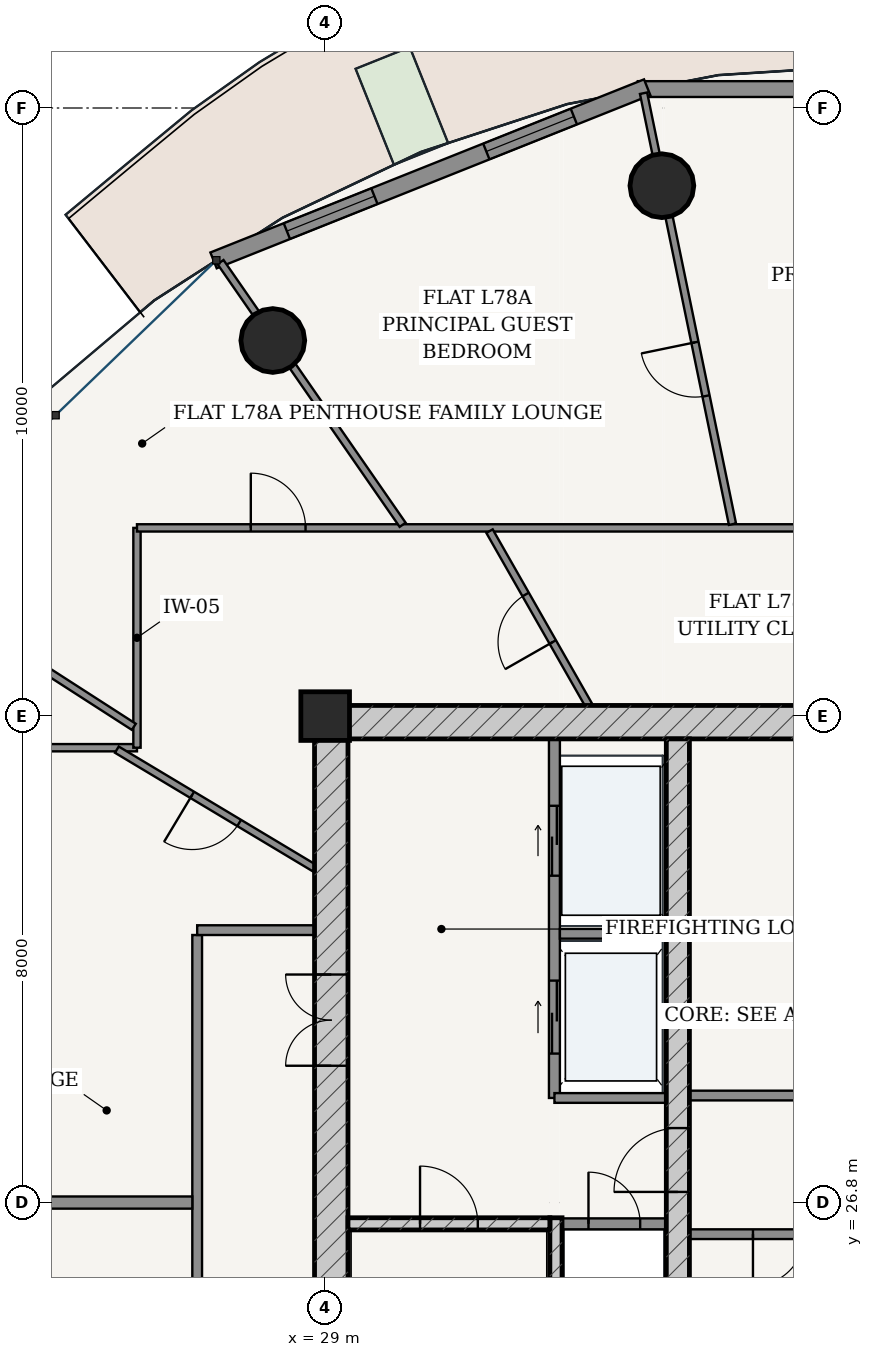
"""IFC4 building model, lengths in metres.
Left out: names, types, materials, properties, quantities, classifications, styles, units other than length and angle.
Written with IfcOpenShell. Run it as: python <this file> out.ifc"""

import sys

from ifc_helpers import new_model, si_unit, direction, frame, frame_2d, origin, origin_2d, place, context, subcontext, project, spatial, rectangle, hollow_circle, extrude, source, transform, mapped, element, fill, save


model = new_model("IFC4")
c1 = context("Model", 3, precision=1e-05, world=origin(), true_north=direction((-0.2419218956, 0.970295726276)))
c2 = subcontext(c1, "Body", "Model", "MODEL_VIEW")
j1 = project(units=[si_unit("LENGTHUNIT", "METRE"), si_unit("PLANEANGLEUNIT", "RADIAN")], contexts=[c1])
p1 = place(None, origin())
s1 = spatial("IfcSite", under=j1, at=p1, CompositionType="ELEMENT")
p2 = place(p1, origin())
s2 = spatial("IfcBuilding", under=s1, at=p2, CompositionType="ELEMENT")
p3 = place(p2, frame((0.0, 0.0, 296.95)))
s3 = spatial("IfcBuildingStorey", under=s2, at=p3, CompositionType="ELEMENT", Elevation=296.95)
p4 = place(p3, frame((29.0, 34.8, 0.0), z_axis=(0.0, 0.0, 1.0), x_axis=(1.0, 0.0, 0.0)))
e1 = element("IfcColumn", 1, at=p4, inside=s3, PredefinedType="COLUMN", context=c2, shape_type="SweptSolid", body=[
    extrude(rectangle(XDim=0.8, YDim=0.8, at=origin_2d()), origin(), (0.0, 0.0, 1.0), 3.75),
])
p5 = place(p3, frame((28.825, 34.7, 0.0), z_axis=(0.0, 0.0, 1.0), x_axis=(1.0, 0.0, 0.0)))
e2 = element("IfcWall", 2, at=p5, inside=s3, PredefinedType="SHEAR", context=c2, shape_type="SweptSolid", body=[
    extrude(rectangle(XDim=18.35, YDim=0.55, at=frame_2d((9.175, 0.0))), origin(), (0.0, 0.0, 1.0), 3.3),
])
p6 = place(p3, frame((29.1, 19.175, 0.0), z_axis=(0.0, 0.0, 1.0), x_axis=(0.0, 1.0, 0.0)))
e3 = element("IfcWall", 3, at=p6, inside=s3, PredefinedType="SHEAR", context=c2, shape_type="SweptSolid", body=[
    extrude(rectangle(XDim=15.25, YDim=0.55, at=frame_2d((7.625, 0.0))), origin(), (0.0, 0.0, 1.0), 3.3),
])
p7 = place(p6, frame((9.875, 0.0, 0.0)))
e4 = element("IfcOpeningElement", 4, at=p7, cuts=e3, PredefinedType="OPENING", context=c2, shape_type="SweptSolid", body=[
    extrude(rectangle(XDim=1.5, YDim=2.2, at=frame_2d((0.75, 1.1))), frame((0.0, 0.285, 0.0), z_axis=(0.0, -1.0, 0.0), x_axis=(1.0, 0.0, 0.0)), (0.0, 0.0, 1.0), 0.57),
])
p8 = place(p3, frame((32.795, 19.175, 0.0), z_axis=(0.0, 0.0, 1.0), x_axis=(0.0, 1.0, 0.0)))
e5 = element("IfcWall", 5, at=p8, inside=s3, PredefinedType="SOLIDWALL", context=c2, shape_type="SweptSolid", body=[
    extrude(rectangle(XDim=7.375, YDim=0.2, at=frame_2d((3.688, 0.0))), origin(), (0.0, 0.0, 1.0), 3.3),
])
p9 = place(p3, frame((29.375, 26.45, 0.0), z_axis=(0.0, 0.0, 1.0), x_axis=(1.0, 0.0, 0.0)))
e6 = element("IfcWall", 6, at=p9, inside=s3, PredefinedType="SOLIDWALL", context=c2, shape_type="SweptSolid", body=[
    extrude(rectangle(XDim=3.32, YDim=0.2, at=frame_2d((1.66, 0.0))), origin(), (0.0, 0.0, 1.0), 3.3),
])
p10 = place(p9, frame((1.185, 0.0, 0.0)))
e7 = element("IfcOpeningElement", 7, at=p10, cuts=e6, PredefinedType="OPENING", context=c2, shape_type="SweptSolid", body=[
    extrude(rectangle(XDim=0.95, YDim=2.15, at=frame_2d((0.475, 1.075))), frame((0.0, 0.11, 0.0), z_axis=(0.0, -1.0, 0.0), x_axis=(1.0, 0.0, 0.0)), (0.0, 0.0, 1.0), 0.22),
])
p11 = place(p3, frame((34.8, 19.175, 0.0), z_axis=(0.0, 0.0, 1.0), x_axis=(0.0, 1.0, 0.0)))
e8 = element("IfcWall", 8, at=p11, inside=s3, PredefinedType="SHEAR", context=c2, shape_type="SweptSolid", body=[
    extrude(rectangle(XDim=15.25, YDim=0.38, at=frame_2d((7.625, 0.0))), origin(), (0.0, 0.0, 1.0), 3.3),
])
p12 = place(p11, frame((7.8, 0.0, 0.0)))
e9 = element("IfcOpeningElement", 9, at=p12, cuts=e8, PredefinedType="OPENING", context=c2, shape_type="SweptSolid", body=[
    extrude(rectangle(XDim=1.05, YDim=2.15, at=frame_2d((0.525, 1.075))), frame((0.0, 0.2, 0.0), z_axis=(0.0, -1.0, 0.0), x_axis=(1.0, 0.0, 0.0)), (0.0, 0.0, 1.0), 0.4),
])
for number, where, z_axis, x_axis in (
    (10, (34.537, 43.522, 0.0), (0.0, 0.0, 1.0), (1.0, 0.0, 0.0)),
    (11, (28.139, 40.977, 0.0), (0.0, 0.0, 1.0), (1.0, 0.0, 0.0)),
):
    element("IfcColumn", number, at=place(p3, frame(where, z_axis=z_axis, x_axis=x_axis)), inside=s3, PredefinedType="COLUMN", context=c2, shape_type="SweptSolid", body=[
        extrude(hollow_circle(Radius=0.525, WallThickness=0.035, at=origin_2d()), origin(), (0.0, 0.0, 1.0), 3.75),
    ])
p13 = place(p3, frame((41.859, 45.111, 0.0), z_axis=(0.0, 0.0, 1.0), x_axis=(-1.0, 0.0, 0.0)))
e12 = element("IfcWall", 12, at=p13, inside=s3, PredefinedType="SOLIDWALL", context=c2, shape_type="SweptSolid", body=[
    extrude(rectangle(XDim=7.718, YDim=0.26, at=frame_2d((3.859, 0.0))), origin(), (0.0, 0.0, 1.0), 3.3),
])
p14 = place(p13, frame((3.184, 0.0, 0.0)))
e13 = element("IfcOpeningElement", 13, at=p14, cuts=e12, PredefinedType="OPENING", context=c2, shape_type="SweptSolid", body=[
    extrude(rectangle(XDim=1.35, YDim=2.2, at=frame_2d((0.675, 1.1))), frame((0.0, 0.14, 0.0), z_axis=(0.0, -1.0, 0.0), x_axis=(1.0, 0.0, 0.0)), (0.0, 0.0, 1.0), 0.28),
])
p15 = place(p3, frame((34.295, 45.141, 0.0), z_axis=(0.0, 0.0, 1.0), x_axis=(-0.928724272392, -0.370771123296, 0.0)))
e14 = element("IfcWall", 14, at=p15, inside=s3, PredefinedType="SOLIDWALL", context=c2, shape_type="SweptSolid", body=[
    extrude(rectangle(XDim=7.678, YDim=0.28, at=frame_2d((3.839, 0.0))), origin(), (0.0, 0.0, 1.0), 3.3),
])
p16 = place(p15, frame((1.298, 0.0, 0.85)))
e15 = element("IfcOpeningElement", 15, at=p16, cuts=e14, PredefinedType="OPENING", context=c2, shape_type="SweptSolid", body=[
    extrude(rectangle(XDim=1.55, YDim=1.95, at=frame_2d((0.775, 0.975))), frame((0.0, 0.15, 0.0), z_axis=(0.0, -1.0, 0.0), x_axis=(1.0, 0.0, 0.0)), (0.0, 0.0, 1.0), 0.3),
])
p17 = place(p15, frame((4.83, 0.0, 0.85)))
e16 = element("IfcOpeningElement", 16, at=p17, cuts=e14, PredefinedType="OPENING", context=c2, shape_type="SweptSolid", body=[
    extrude(rectangle(XDim=1.55, YDim=1.95, at=frame_2d((0.775, 0.975))), frame((0.0, 0.15, 0.0), z_axis=(0.0, -1.0, 0.0), x_axis=(1.0, 0.0, 0.0)), (0.0, 0.0, 1.0), 0.3),
])
p18 = place(p3, frame((32.9, 26.45, 0.0), z_axis=(0.0, 0.0, 1.0), x_axis=(1.0, 0.0, 0.0)))
e17 = element("IfcWall", 17, at=p18, inside=s3, PredefinedType="PARTITIONING", context=c2, shape_type="SweptSolid", body=[
    extrude(rectangle(XDim=1.71, YDim=0.18, at=frame_2d((0.855, 0.0))), origin(), (0.0, 0.0, 1.0), 3.3),
])
p19 = place(p18, frame((0.43, 0.0, 0.0)))
e18 = element("IfcOpeningElement", 18, at=p19, cuts=e17, PredefinedType="OPENING", context=c2, shape_type="SweptSolid", body=[
    extrude(rectangle(XDim=0.85, YDim=2.1, at=frame_2d((0.425, 1.05))), frame((0.0, 0.1, 0.0), z_axis=(0.0, -1.0, 0.0), x_axis=(1.0, 0.0, 0.0)), (0.0, 0.0, 1.0), 0.2),
])
p20 = place(p3, frame((32.77, 28.52, 0.0), z_axis=(0.0, 0.0, 1.0), x_axis=(0.0, 1.0, 0.0)))
e19 = element("IfcWall", 19, at=p20, inside=s3, PredefinedType="PARTITIONING", context=c2, shape_type="SweptSolid", body=[
    extrude(rectangle(XDim=5.905, YDim=0.18, at=frame_2d((2.953, 0.0))), origin(), (0.0, 0.0, 1.0), 3.3),
])
p21 = place(p20, frame((3.655, 0.0, 0.0)))
e20 = element("IfcOpeningElement", 20, at=p21, cuts=e19, PredefinedType="OPENING", context=c2, shape_type="SweptSolid", body=[
    extrude(rectangle(XDim=1.15, YDim=2.2, at=frame_2d((0.575, 1.1))), frame((0.0, 0.1, 0.0), z_axis=(0.0, -1.0, 0.0), x_axis=(1.0, 0.0, 0.0)), (0.0, 0.0, 1.0), 0.2),
])
p22 = place(p20, frame((0.73, 0.0, 0.0)))
e21 = element("IfcOpeningElement", 21, at=p22, cuts=e19, PredefinedType="OPENING", context=c2, shape_type="SweptSolid", body=[
    extrude(rectangle(XDim=1.2, YDim=2.25, at=frame_2d((0.6, 1.125))), frame((0.0, 0.1, 0.0), z_axis=(0.0, -1.0, 0.0), x_axis=(1.0, 0.0, 0.0)), (0.0, 0.0, 1.0), 0.2),
])
p23 = place(p3, frame((32.86, 31.22, 0.0), z_axis=(0.0, 0.0, 1.0), x_axis=(1.0, 0.0, 0.0)))
e22 = element("IfcWall", 22, at=p23, inside=s3, PredefinedType="PARTITIONING", context=c2, shape_type="SweptSolid", body=[
    extrude(rectangle(XDim=1.75, YDim=0.16, at=frame_2d((0.875, 0.0))), origin(), (0.0, 0.0, 1.0), 3.3),
])
p24 = place(p3, frame((32.77, 28.52, 0.0), z_axis=(0.0, 0.0, 1.0), x_axis=(1.0, 0.0, 0.0)))
e23 = element("IfcWall", 23, at=p24, inside=s3, PredefinedType="PARTITIONING", context=c2, shape_type="SweptSolid", body=[
    extrude(rectangle(XDim=1.84, YDim=0.16, at=frame_2d((0.92, 0.0))), origin(), (0.0, 0.0, 1.0), 3.3),
])
p25 = place(p3, frame((34.99, 28.56, 0.0), z_axis=(0.0, 0.0, 1.0), x_axis=(1.0, 0.0, 0.0)))
e24 = element("IfcWall", 24, at=p25, inside=s3, PredefinedType="PARTITIONING", context=c2, shape_type="SweptSolid", body=[
    extrude(rectangle(XDim=6.02, YDim=0.16, at=frame_2d((3.01, 0.0))), origin(), (0.0, 0.0, 1.0), 3.3),
])
p26 = place(p25, frame((2.585, 0.0, 0.0)))
e25 = element("IfcOpeningElement", 25, at=p26, cuts=e24, PredefinedType="OPENING", context=c2, shape_type="SweptSolid", body=[
    extrude(rectangle(XDim=0.85, YDim=2.1, at=frame_2d((0.425, 1.05))), frame((0.0, 0.09, 0.0), z_axis=(0.0, -1.0, 0.0), x_axis=(1.0, 0.0, 0.0)), (0.0, 0.0, 1.0), 0.18),
])
p27 = place(p3, frame((34.99, 26.28, 0.0), z_axis=(0.0, 0.0, 1.0), x_axis=(1.0, 0.0, 0.0)))
e26 = element("IfcWall", 26, at=p27, inside=s3, PredefinedType="PARTITIONING", context=c2, shape_type="SweptSolid", body=[
    extrude(rectangle(XDim=6.02, YDim=0.16, at=frame_2d((3.01, 0.0))), origin(), (0.0, 0.0, 1.0), 3.3),
])
p28 = place(p27, frame((1.045, 0.0, 0.0)))
e27 = element("IfcOpeningElement", 27, at=p28, cuts=e26, PredefinedType="OPENING", context=c2, shape_type="SweptSolid", body=[
    extrude(rectangle(XDim=0.85, YDim=2.1, at=frame_2d((0.425, 1.05))), frame((0.0, 0.09, 0.0), z_axis=(0.0, -1.0, 0.0), x_axis=(1.0, 0.0, 0.0)), (0.0, 0.0, 1.0), 0.18),
])
p29 = place(p27, frame((3.215, 0.0, 0.0)))
e28 = element("IfcOpeningElement", 28, at=p29, cuts=e26, PredefinedType="OPENING", context=c2, shape_type="SweptSolid", body=[
    extrude(rectangle(XDim=1.1, YDim=2.2, at=frame_2d((0.55, 1.1))), frame((0.0, 0.09, 0.0), z_axis=(0.0, -1.0, 0.0), x_axis=(1.0, 0.0, 0.0)), (0.0, 0.0, 1.0), 0.18),
])
p30 = place(p27, frame((4.695, 0.0, 0.0)))
e29 = element("IfcOpeningElement", 29, at=p30, cuts=e26, PredefinedType="OPENING", context=c2, shape_type="SweptSolid", body=[
    extrude(rectangle(XDim=1.1, YDim=2.2, at=frame_2d((0.55, 1.1))), frame((0.0, 0.09, 0.0), z_axis=(0.0, -1.0, 0.0), x_axis=(1.0, 0.0, 0.0)), (0.0, 0.0, 1.0), 0.18),
])
p31 = place(p3, frame((26.895, 17.275, 0.0), z_axis=(0.0, 0.0, 1.0), x_axis=(0.0, 1.0, 0.0)))
e30 = element("IfcWall", 30, at=p31, inside=s3, PredefinedType="PARTITIONING", context=c2, shape_type="SweptSolid", body=[
    extrude(rectangle(XDim=13.925, YDim=0.16, at=frame_2d((6.962, 0.0))), origin(), (0.0, 0.0, 1.0), 2.825),
])
p32 = place(p3, frame((26.895, 31.28, 0.0), z_axis=(0.0, 0.0, 1.0), x_axis=(1.0, 0.0, 0.0)))
e31 = element("IfcWall", 31, at=p32, inside=s3, PredefinedType="PARTITIONING", context=c2, shape_type="SweptSolid", body=[
    extrude(rectangle(XDim=1.93, YDim=0.16, at=frame_2d((0.965, 0.0))), origin(), (0.0, 0.0, 1.0), 3.3),
])
p33 = place(p3, frame((23.895, 34.28, 0.0), z_axis=(0.0, 0.0, 1.0), x_axis=(1.0, 0.0, 0.0)))
e32 = element("IfcWall", 32, at=p33, inside=s3, PredefinedType="PARTITIONING", context=c2, shape_type="SweptSolid", body=[
    extrude(rectangle(XDim=2.01, YDim=0.12, at=frame_2d((1.005, 0.0))), origin(), (0.0, 0.0, 1.0), 3.3),
])
p34 = place(p3, frame((25.905, 34.28, 0.0), z_axis=(0.0, 0.0, 1.0), x_axis=(0.0, 1.0, 0.0)))
e33 = element("IfcWall", 33, at=p34, inside=s3, PredefinedType="PARTITIONING", context=c2, shape_type="SweptSolid", body=[
    extrude(rectangle(XDim=3.615, YDim=0.12, at=frame_2d((1.808, 0.0))), origin(), (0.0, 0.0, 1.0), 2.825),
])
p35 = place(p3, frame((25.905, 37.895, 0.0), z_axis=(0.0, 0.0, 1.0), x_axis=(1.0, 0.0, 0.0)))
e34 = element("IfcWall", 34, at=p35, inside=s3, PredefinedType="PARTITIONING", context=c2, shape_type="SweptSolid", body=[
    extrude(rectangle(XDim=24.19, YDim=0.12, at=frame_2d((12.095, 0.0))), origin(), (0.0, 0.0, 1.0), 2.825),
])
p36 = place(p35, frame((21.621, 0.0, 0.0)))
e35 = element("IfcOpeningElement", 35, at=p36, cuts=e34, PredefinedType="OPENING", context=c2, shape_type="SweptSolid", body=[
    extrude(rectangle(XDim=0.9, YDim=2.15, at=frame_2d((0.45, 1.075))), frame((0.0, 0.07, 0.0), z_axis=(0.0, -1.0, 0.0), x_axis=(1.0, 0.0, 0.0)), (0.0, 0.0, 1.0), 0.14),
])
p37 = place(p35, frame((16.661, 0.0, 0.0)))
e36 = element("IfcOpeningElement", 36, at=p37, cuts=e34, PredefinedType="OPENING", context=c2, shape_type="SweptSolid", body=[
    extrude(rectangle(XDim=0.9, YDim=2.15, at=frame_2d((0.45, 1.075))), frame((0.0, 0.07, 0.0), z_axis=(0.0, -1.0, 0.0), x_axis=(1.0, 0.0, 0.0)), (0.0, 0.0, 1.0), 0.14),
])
p38 = place(p35, frame((1.872, 0.0, 0.0)))
e37 = element("IfcOpeningElement", 37, at=p38, cuts=e34, PredefinedType="OPENING", context=c2, shape_type="SweptSolid", body=[
    extrude(rectangle(XDim=0.9, YDim=2.15, at=frame_2d((0.45, 1.075))), frame((0.0, 0.07, 0.0), z_axis=(0.0, -1.0, 0.0), x_axis=(1.0, 0.0, 0.0)), (0.0, 0.0, 1.0), 0.14),
])
p39 = place(p3, frame((35.698, 37.956, 0.0), z_axis=(0.0, 0.0, 1.0), x_axis=(-0.20211361456, 0.979362081566, 0.0)))
e38 = element("IfcWall", 38, at=p39, inside=s3, PredefinedType="PARTITIONING", context=c2, shape_type="SweptSolid", body=[
    extrude(rectangle(XDim=7.237, YDim=0.12, at=frame_2d((3.618, 0.0))), origin(), (0.0, 0.0, 1.0), 2.65),
])
p40 = place(p39, frame((2.153, 0.0, 0.0)))
e39 = element("IfcOpeningElement", 39, at=p40, cuts=e38, PredefinedType="OPENING", context=c2, shape_type="SweptSolid", body=[
    extrude(rectangle(XDim=0.9, YDim=2.15, at=frame_2d((0.45, 1.075))), frame((0.0, 0.07, 0.0), z_axis=(0.0, -1.0, 0.0), x_axis=(1.0, 0.0, 0.0)), (0.0, 0.0, 1.0), 0.14),
])
p41 = place(p3, frame((30.274, 37.946, 0.0), z_axis=(0.0, 0.0, 1.0), x_axis=(-0.569678410446, 0.821867695357, 0.0)))
e40 = element("IfcWall", 40, at=p41, inside=s3, PredefinedType="PARTITIONING", context=c2, shape_type="SweptSolid", body=[
    extrude(rectangle(XDim=5.257, YDim=0.12, at=frame_2d((2.628, 0.0))), origin(), (0.0, 0.0, 1.0), 2.65),
])
p42 = place(p3, frame((25.853, 34.624, 0.0), z_axis=(0.0, 0.0, 1.0), x_axis=(-0.840694066929, 0.541510374628, 0.0)))
e41 = element("IfcWall", 41, at=p42, inside=s3, PredefinedType="PARTITIONING", context=c2, shape_type="SweptSolid", body=[
    extrude(rectangle(XDim=4.637, YDim=0.12, at=frame_2d((2.319, 0.0))), origin(), (0.0, 0.0, 1.0), 2.65),
])
p43 = place(p3, frame((33.336, 34.977, 0.0), z_axis=(0.0, 0.0, 1.0), x_axis=(-0.495413156231, 0.86865747256, 0.0)))
e42 = element("IfcWall", 42, at=p43, inside=s3, PredefinedType="PARTITIONING", context=c2, shape_type="SweptSolid", body=[
    extrude(rectangle(XDim=3.297, YDim=0.12, at=frame_2d((1.649, 0.0))), origin(), (0.0, 0.0, 1.0), 3.3),
])
p44 = place(p43, frame((1.199, 0.0, 0.0)))
e43 = element("IfcOpeningElement", 43, at=p44, cuts=e42, PredefinedType="OPENING", context=c2, shape_type="SweptSolid", body=[
    extrude(rectangle(XDim=0.9, YDim=2.15, at=frame_2d((0.45, 1.075))), frame((0.0, 0.07, 0.0), z_axis=(0.0, -1.0, 0.0), x_axis=(1.0, 0.0, 0.0)), (0.0, 0.0, 1.0), 0.14),
])
p45 = place(p3, frame((28.825, 32.3, 0.0), z_axis=(0.0, 0.0, 1.0), x_axis=(-0.857737223377, 0.514088373369, 0.0)))
e44 = element("IfcWall", 44, at=p45, inside=s3, PredefinedType="PARTITIONING", context=c2, shape_type="SweptSolid", body=[
    extrude(rectangle(XDim=3.79, YDim=0.12, at=frame_2d((1.895, 0.0))), origin(), (0.0, 0.0, 1.0), 3.019),
])
p46 = place(p45, frame((1.445, 0.0, 0.0)))
e45 = element("IfcOpeningElement", 45, at=p46, cuts=e44, PredefinedType="OPENING", context=c2, shape_type="SweptSolid", body=[
    extrude(rectangle(XDim=0.9, YDim=2.15, at=frame_2d((0.45, 1.075))), frame((0.0, 0.07, 0.0), z_axis=(0.0, -1.0, 0.0), x_axis=(1.0, 0.0, 0.0)), (0.0, 0.0, 1.0), 0.14),
])
p47 = place(p3, frame((26.815, 26.8, 0.0), z_axis=(0.0, 0.0, 1.0), x_axis=(-1.0, 0.0, 0.0)))
e46 = element("IfcWall", 46, at=p47, inside=s3, PredefinedType="PARTITIONING", context=c2, shape_type="SweptSolid", body=[
    extrude(rectangle(XDim=8.155, YDim=0.2, at=frame_2d((4.078, 0.0))), origin(), (0.0, 0.0, 1.0), 2.931),
])
m1 = source(origin(), c2, "Body", "SweptSolid", [
    extrude(rectangle(XDim=1.55, YDim=1.95, at=frame_2d((0.775, 0.975))), frame((0.0, 0.03, 0.0), z_axis=(0.0, -1.0, 0.0), x_axis=(1.0, 0.0, 0.0)), (0.0, 0.0, 1.0), 0.06),
])
p48 = place(p16, origin())
e47 = element("IfcWindow", 47, at=p48, inside=s3, PartitioningType="SINGLE_PANEL", PredefinedType="WINDOW", context=c2, shape_type="MappedRepresentation", body=[
    mapped(m1, transform((0.0, 0.0, 0.0), scale=1.0)),
])
fill(e15, e47)
p49 = place(p17, origin())
e48 = element("IfcWindow", 48, at=p49, inside=s3, PartitioningType="SINGLE_PANEL", PredefinedType="WINDOW", context=c2, shape_type="MappedRepresentation", body=[
    mapped(m1, transform((0.0, 0.0, 0.0), scale=1.0)),
])
fill(e16, e48)
m2 = source(origin(), c2, "Body", "SweptSolid", [
    extrude(rectangle(XDim=1.5, YDim=2.2, at=frame_2d((0.75, 1.1))), frame((0.0, 0.025, 0.0), z_axis=(0.0, -1.0, 0.0), x_axis=(1.0, 0.0, 0.0)), (0.0, 0.0, 1.0), 0.05),
])
p50 = place(p7, origin())
e49 = element("IfcDoor", 49, at=p50, inside=s3, OperationType="DOUBLE_DOOR_SINGLE_SWING", PredefinedType="DOOR", context=c2, shape_type="MappedRepresentation", body=[
    mapped(m2, transform((0.0, 0.0, 0.0), scale=1.0)),
])
fill(e4, e49)
m3 = source(origin(), c2, "Body", "SweptSolid", [
    extrude(rectangle(XDim=1.05, YDim=2.15, at=frame_2d((0.525, 1.075))), frame((0.0, 0.025, 0.0), z_axis=(0.0, -1.0, 0.0), x_axis=(1.0, 0.0, 0.0)), (0.0, 0.0, 1.0), 0.05),
])
p51 = place(p12, origin())
e50 = element("IfcDoor", 50, at=p51, inside=s3, OperationType="SINGLE_SWING_LEFT", PredefinedType="DOOR", context=c2, shape_type="MappedRepresentation", body=[
    mapped(m3, transform((0.0, 0.0, 0.0), scale=1.0)),
])
fill(e9, e50)
m4 = source(origin(), c2, "Body", "SweptSolid", [
    extrude(rectangle(XDim=0.95, YDim=2.15, at=frame_2d((0.475, 1.075))), frame((0.0, 0.025, 0.0), z_axis=(0.0, -1.0, 0.0), x_axis=(1.0, 0.0, 0.0)), (0.0, 0.0, 1.0), 0.05),
])
p52 = place(p10, origin())
e51 = element("IfcDoor", 51, at=p52, inside=s3, OperationType="SINGLE_SWING_LEFT", PredefinedType="DOOR", context=c2, shape_type="MappedRepresentation", body=[
    mapped(m4, transform((0.0, 0.0, 0.0), scale=1.0)),
])
fill(e7, e51)
m5 = source(origin(), c2, "Body", "SweptSolid", [
    extrude(rectangle(XDim=0.85, YDim=2.1, at=frame_2d((0.425, 1.05))), frame((0.0, 0.025, 0.0), z_axis=(0.0, -1.0, 0.0), x_axis=(1.0, 0.0, 0.0)), (0.0, 0.0, 1.0), 0.05),
])
p53 = place(p19, origin())
e52 = element("IfcDoor", 52, at=p53, inside=s3, OperationType="SINGLE_SWING_LEFT", PredefinedType="DOOR", context=c2, shape_type="MappedRepresentation", body=[
    mapped(m5, transform((0.0, 0.0, 0.0), scale=1.0)),
])
fill(e18, e52)
p54 = place(p28, frame((0.85, 0.0, 0.0), z_axis=(0.0, 0.0, 1.0), x_axis=(-1.0, 0.0, 0.0)))
e53 = element("IfcDoor", 53, at=p54, inside=s3, OperationType="SINGLE_SWING_RIGHT", PredefinedType="DOOR", context=c2, shape_type="MappedRepresentation", body=[
    mapped(m5, transform((0.0, 0.0, 0.0), scale=1.0)),
])
fill(e27, e53)
m6 = source(origin(), c2, "Body", "SweptSolid", [
    extrude(rectangle(XDim=1.15, YDim=2.2, at=frame_2d((0.575, 1.1))), frame((0.0, 0.025, 0.0), z_axis=(0.0, -1.0, 0.0), x_axis=(1.0, 0.0, 0.0)), (0.0, 0.0, 1.0), 0.05),
])
p55 = place(p21, origin())
e54 = element("IfcDoor", 54, at=p55, inside=s3, OperationType="DOUBLE_DOOR_SLIDING", PredefinedType="DOOR", context=c2, shape_type="MappedRepresentation", body=[
    mapped(m6, transform((0.0, 0.0, 0.0), scale=1.0)),
])
fill(e20, e54)
m7 = source(origin(), c2, "Body", "SweptSolid", [
    extrude(rectangle(XDim=1.2, YDim=2.25, at=frame_2d((0.6, 1.125))), frame((0.0, 0.025, 0.0), z_axis=(0.0, -1.0, 0.0), x_axis=(1.0, 0.0, 0.0)), (0.0, 0.0, 1.0), 0.05),
])
p56 = place(p22, origin())
e55 = element("IfcDoor", 55, at=p56, inside=s3, OperationType="DOUBLE_DOOR_SLIDING", PredefinedType="DOOR", context=c2, shape_type="MappedRepresentation", body=[
    mapped(m7, transform((0.0, 0.0, 0.0), scale=1.0)),
])
fill(e21, e55)
m8 = source(origin(), c2, "Body", "SweptSolid", [
    extrude(rectangle(XDim=0.9, YDim=2.15, at=frame_2d((0.45, 1.075))), frame((0.0, 0.025, 0.0), z_axis=(0.0, -1.0, 0.0), x_axis=(1.0, 0.0, 0.0)), (0.0, 0.0, 1.0), 0.05),
])
p57 = place(p44, origin())
e56 = element("IfcDoor", 56, at=p57, inside=s3, OperationType="SINGLE_SWING_LEFT", PredefinedType="DOOR", context=c2, shape_type="MappedRepresentation", body=[
    mapped(m8, transform((0.0, 0.0, 0.0), scale=1.0)),
])
fill(e43, e56)
p58 = place(p46, origin())
e57 = element("IfcDoor", 57, at=p58, inside=s3, OperationType="SINGLE_SWING_RIGHT", PredefinedType="DOOR", context=c2, shape_type="MappedRepresentation", body=[
    mapped(m8, transform((0.0, 0.0, 0.0), scale=1.0)),
])
fill(e45, e57)
p59 = place(p40, origin())
e58 = element("IfcDoor", 58, at=p59, inside=s3, OperationType="SINGLE_SWING_RIGHT", PredefinedType="DOOR", context=c2, shape_type="MappedRepresentation", body=[
    mapped(m8, transform((0.0, 0.0, 0.0), scale=1.0)),
])
fill(e39, e58)
p60 = place(p38, origin())
e59 = element("IfcDoor", 59, at=p60, inside=s3, OperationType="SINGLE_SWING_LEFT", PredefinedType="DOOR", context=c2, shape_type="MappedRepresentation", body=[
    mapped(m8, transform((0.0, 0.0, 0.0), scale=1.0)),
])
fill(e37, e59)
save(model, sys.argv[1])
